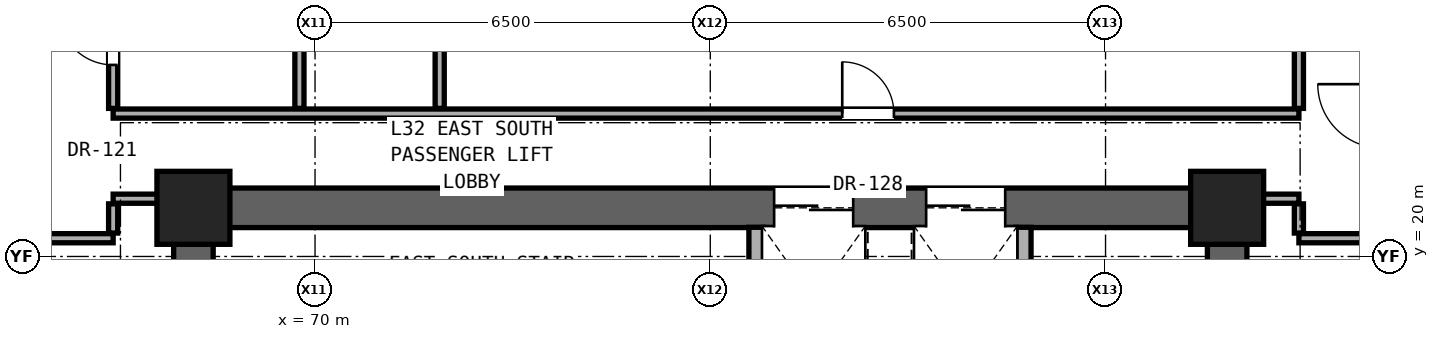
"""IFC4 building model, lengths in metres.
Left out: names, types, materials, properties, quantities, classifications, styles, units other than length and angle.
Written with IfcOpenShell. Run it as: python <this file> out.ifc"""

import sys

from ifc_helpers import new_model, si_unit, direction, frame, frame_2d, origin, origin_2d, place, context, subcontext, project, spatial, rectangle, extrude, element, fill, save


model = new_model("IFC4")
c1 = context("Model", 3, precision=1e-05, world=origin(), true_north=direction((0.0, 1.0)))
c2 = subcontext(c1, "Body", "Model", "MODEL_VIEW")
j1 = project(units=[si_unit("LENGTHUNIT", "METRE"), si_unit("PLANEANGLEUNIT", "RADIAN")], contexts=[c1])
p1 = place(None, origin())
s1 = spatial("IfcSite", under=j1, at=p1, CompositionType="ELEMENT")
p2 = place(p1, origin())
s2 = spatial("IfcBuilding", under=s1, at=p2, CompositionType="ELEMENT")
p3 = place(p2, frame((0.0, 0.0, 114.8)))
s3 = spatial("IfcBuildingStorey", under=s2, at=p3, CompositionType="ELEMENT", Elevation=114.8)
for number, where, z_axis, x_axis in (
    (1, (68.0, 20.8, 0.0), (0.0, 0.0, 1.0), (1.0, 0.0, 0.0)),
    (2, (85.0, 20.8, 0.0), (0.0, 0.0, 1.0), (1.0, 0.0, 0.0)),
):
    element("IfcColumn", number, at=place(p3, frame(where, z_axis=z_axis, x_axis=x_axis)), inside=s3, PredefinedType="COLUMN", context=c2, shape_type="SweptSolid", body=[
        extrude(rectangle(XDim=1.2, YDim=1.2, at=origin_2d()), origin(), (0.0, 0.0, 1.0), 3.3),
    ])
for number, where, z_axis, x_axis in (
    (3, (68.0, 15.2, 0.0), (0.0, 0.0, 1.0), (0.0, 1.0, 0.0)),
    (4, (85.0, 15.2, 0.0), (0.0, 0.0, 1.0), (0.0, 1.0, 0.0)),
):
    element("IfcWall", number, at=place(p3, frame(where, z_axis=z_axis, x_axis=x_axis)), inside=s3, PredefinedType="SHEAR", context=c2, shape_type="SweptSolid", body=[
        extrude(rectangle(XDim=5.6, YDim=0.65, at=frame_2d((2.8, 0.0))), origin(), (0.0, 0.0, 1.0), 3.08),
    ])
p4 = place(p3, frame((68.0, 20.8, 0.0), z_axis=(0.0, 0.0, 1.0), x_axis=(1.0, 0.0, 0.0)))
e5 = element("IfcWall", 5, at=p4, inside=s3, PredefinedType="SHEAR", context=c2, shape_type="SweptSolid", body=[
    extrude(rectangle(XDim=17.0, YDim=0.65, at=frame_2d((8.5, 0.0))), origin(), (0.0, 0.0, 1.0), 3.08),
])
p5 = place(p4, frame((9.55, 0.0, 0.0)))
e6 = element("IfcOpeningElement", 6, at=p5, cuts=e5, PredefinedType="OPENING", context=c2, shape_type="SweptSolid", body=[
    extrude(rectangle(XDim=1.3, YDim=2.3, at=frame_2d((0.65, 1.15))), frame((0.0, 0.335, 0.0), z_axis=(0.0, -1.0, 0.0), x_axis=(1.0, 0.0, 0.0)), (0.0, 0.0, 1.0), 0.67),
])
p6 = place(p4, frame((12.05, 0.0, 0.0)))
e7 = element("IfcOpeningElement", 7, at=p6, cuts=e5, PredefinedType="OPENING", context=c2, shape_type="SweptSolid", body=[
    extrude(rectangle(XDim=1.3, YDim=2.3, at=frame_2d((0.65, 1.15))), frame((0.0, 0.335, 0.0), z_axis=(0.0, -1.0, 0.0), x_axis=(1.0, 0.0, 0.0)), (0.0, 0.0, 1.0), 0.67),
])
p7 = place(p3, frame((65.32, 20.3, 0.0), z_axis=(0.0, 0.0, 1.0), x_axis=(1.0, 0.0, 0.0)))
e8 = element("IfcWall", 8, at=p7, inside=s3, PredefinedType="PARTITIONING", context=c2, shape_type="SweptSolid", body=[
    extrude(rectangle(XDim=1.36, YDim=0.15, at=frame_2d((0.68, 0.0))), origin(), (0.0, 0.0, 1.0), 3.08),
])
p8 = place(p3, frame((86.18, 20.3, 0.0), z_axis=(0.0, 0.0, 1.0), x_axis=(1.0, 0.0, 0.0)))
e9 = element("IfcWall", 9, at=p8, inside=s3, PredefinedType="PARTITIONING", context=c2, shape_type="SweptSolid", body=[
    extrude(rectangle(XDim=1.36, YDim=0.15, at=frame_2d((0.68, 0.0))), origin(), (0.0, 0.0, 1.0), 3.08),
])
p9 = place(p3, frame((66.68, 20.95, 0.0), z_axis=(0.0, 0.0, 1.0), x_axis=(1.0, 0.0, 0.0)))
e10 = element("IfcWall", 10, at=p9, inside=s3, PredefinedType="PARTITIONING", context=c2, shape_type="SweptSolid", body=[
    extrude(rectangle(XDim=1.0, YDim=0.15, at=frame_2d((0.5, 0.0))), origin(), (0.0, 0.0, 1.0), 2.472),
])
p10 = place(p3, frame((85.32, 20.95, 0.0), z_axis=(0.0, 0.0, 1.0), x_axis=(1.0, 0.0, 0.0)))
e11 = element("IfcWall", 11, at=p10, inside=s3, PredefinedType="PARTITIONING", context=c2, shape_type="SweptSolid", body=[
    extrude(rectangle(XDim=0.86, YDim=0.15, at=frame_2d((0.43, 0.0))), origin(), (0.0, 0.0, 1.0), 2.472),
])
p11 = place(p3, frame((66.68, 22.35, 0.0), z_axis=(0.0, 0.0, 1.0), x_axis=(1.0, 0.0, 0.0)))
e12 = element("IfcWall", 12, at=p11, inside=s3, PredefinedType="PARTITIONING", context=c2, shape_type="SweptSolid", body=[
    extrude(rectangle(XDim=19.5, YDim=0.15, at=frame_2d((9.75, 0.0))), origin(), (0.0, 0.0, 1.0), 2.145),
])
p12 = place(p11, frame((11.99, 0.0, 0.0)))
e13 = element("IfcOpeningElement", 13, at=p12, cuts=e12, PredefinedType="OPENING", context=c2, shape_type="SweptSolid", body=[
    extrude(rectangle(XDim=0.85, YDim=2.01, at=frame_2d((0.425, 1.005))), frame((0.0, 0.085, 0.0), z_axis=(0.0, -1.0, 0.0), x_axis=(1.0, 0.0, 0.0)), (0.0, 0.0, 1.0), 0.17),
])
p13 = place(p3, frame((66.68, 20.385, 0.0), z_axis=(0.0, 0.0, 1.0), x_axis=(0.0, 1.0, 0.0)))
e14 = element("IfcWall", 14, at=p13, inside=s3, PredefinedType="PARTITIONING", context=c2, shape_type="SweptSolid", body=[
    extrude(rectangle(XDim=0.48, YDim=0.15, at=frame_2d((0.24, 0.0))), origin(), (0.0, 0.0, 1.0), 2.472),
])
p14 = place(p3, frame((66.68, 22.435, 0.0), z_axis=(0.0, 0.0, 1.0), x_axis=(0.0, 1.0, 0.0)))
e15 = element("IfcWall", 15, at=p14, inside=s3, PredefinedType="PARTITIONING", context=c2, shape_type="SweptSolid", body=[
    extrude(rectangle(XDim=2.33, YDim=0.15, at=frame_2d((1.165, 0.0))), origin(), (0.0, 0.0, 1.0), 3.08),
])
p15 = place(p14, frame((0.715, 0.0, 0.0)))
e16 = element("IfcOpeningElement", 16, at=p15, cuts=e15, PredefinedType="OPENING", context=c2, shape_type="SweptSolid", body=[
    extrude(rectangle(XDim=0.9, YDim=2.1, at=frame_2d((0.45, 1.05))), frame((0.0, 0.085, 0.0), z_axis=(0.0, -1.0, 0.0), x_axis=(1.0, 0.0, 0.0)), (0.0, 0.0, 1.0), 0.17),
])
p16 = place(p3, frame((69.743, 22.435, 0.0), z_axis=(0.0, 0.0, 1.0), x_axis=(0.0, 1.0, 0.0)))
e17 = element("IfcWall", 17, at=p16, inside=s3, PredefinedType="PARTITIONING", context=c2, shape_type="SweptSolid", body=[
    extrude(rectangle(XDim=2.33, YDim=0.15, at=frame_2d((1.165, 0.0))), origin(), (0.0, 0.0, 1.0), 3.08),
])
p17 = place(p3, frame((72.05, 22.435, 0.0), z_axis=(0.0, 0.0, 1.0), x_axis=(0.0, 1.0, 0.0)))
e18 = element("IfcWall", 18, at=p17, inside=s3, PredefinedType="PARTITIONING", context=c2, shape_type="SweptSolid", body=[
    extrude(rectangle(XDim=4.312, YDim=0.15, at=frame_2d((2.156, 0.0))), origin(), (0.0, 0.0, 1.0), 2.609),
])
p18 = place(p3, frame((77.26, 18.735, 0.0), z_axis=(0.0, 0.0, 1.0), x_axis=(0.0, 1.0, 0.0)))
e19 = element("IfcWall", 19, at=p18, inside=s3, PredefinedType="SOLIDWALL", context=c2, shape_type="SweptSolid", body=[
    extrude(rectangle(XDim=1.745, YDim=0.25, at=frame_2d((0.873, 0.0))), origin(), (0.0, 0.0, 1.0), 3.08),
])
p19 = place(p3, frame((81.65, 18.185, 0.0), z_axis=(0.0, 0.0, 1.0), x_axis=(0.0, 1.0, 0.0)))
e20 = element("IfcWall", 20, at=p19, inside=s3, PredefinedType="SOLIDWALL", context=c2, shape_type="SweptSolid", body=[
    extrude(rectangle(XDim=2.295, YDim=0.25, at=frame_2d((1.147, 0.0))), origin(), (0.0, 0.0, 1.0), 3.08),
])
p20 = place(p3, frame((86.18, 20.385, 0.0), z_axis=(0.0, 0.0, 1.0), x_axis=(0.0, 1.0, 0.0)))
e21 = element("IfcWall", 21, at=p20, inside=s3, PredefinedType="PARTITIONING", context=c2, shape_type="SweptSolid", body=[
    extrude(rectangle(XDim=0.48, YDim=0.15, at=frame_2d((0.24, 0.0))), origin(), (0.0, 0.0, 1.0), 2.472),
])
p21 = place(p3, frame((86.18, 22.435, 0.0), z_axis=(0.0, 0.0, 1.0), x_axis=(0.0, 1.0, 0.0)))
e22 = element("IfcWall", 22, at=p21, inside=s3, PredefinedType="PARTITIONING", context=c2, shape_type="SweptSolid", body=[
    extrude(rectangle(XDim=4.312, YDim=0.15, at=frame_2d((2.156, 0.0))), origin(), (0.0, 0.0, 1.0), 3.08),
])
p22 = place(p15, origin())
e23 = element("IfcDoor", 23, at=p22, inside=s3, OperationType="SINGLE_SWING_RIGHT", PredefinedType="DOOR", context=c2, shape_type="SweptSolid", body=[
    extrude(rectangle(XDim=0.9, YDim=2.1, at=frame_2d((0.45, 1.05))), frame((0.0, 0.025, 0.0), z_axis=(0.0, -1.0, 0.0), x_axis=(1.0, 0.0, 0.0)), (0.0, 0.0, 1.0), 0.05),
])
fill(e16, e23)
p23 = place(p12, origin())
e24 = element("IfcDoor", 24, at=p23, inside=s3, OperationType="SINGLE_SWING_LEFT", PredefinedType="DOOR", context=c2, shape_type="SweptSolid", body=[
    extrude(rectangle(XDim=0.85, YDim=2.01, at=frame_2d((0.425, 1.005))), frame((0.0, 0.025, 0.0), z_axis=(0.0, -1.0, 0.0), x_axis=(1.0, 0.0, 0.0)), (0.0, 0.0, 1.0), 0.05),
])
fill(e13, e24)
p24 = place(p5, origin())
e25 = element("IfcDoor", 25, at=p24, inside=s3, OperationType="DOUBLE_DOOR_SLIDING", PredefinedType="DOOR", context=c2, shape_type="SweptSolid", body=[
    extrude(rectangle(XDim=1.3, YDim=2.3, at=frame_2d((0.65, 1.15))), frame((0.0, 0.025, 0.0), z_axis=(0.0, -1.0, 0.0), x_axis=(1.0, 0.0, 0.0)), (0.0, 0.0, 1.0), 0.05),
])
fill(e6, e25)
p25 = place(p6, origin())
e26 = element("IfcDoor", 26, at=p25, inside=s3, OperationType="DOUBLE_DOOR_SLIDING", PredefinedType="DOOR", context=c2, shape_type="SweptSolid", body=[
    extrude(rectangle(XDim=1.3, YDim=2.3, at=frame_2d((0.65, 1.15))), frame((0.0, 0.025, 0.0), z_axis=(0.0, -1.0, 0.0), x_axis=(1.0, 0.0, 0.0)), (0.0, 0.0, 1.0), 0.05),
])
fill(e7, e26)
save(model, sys.argv[1])
